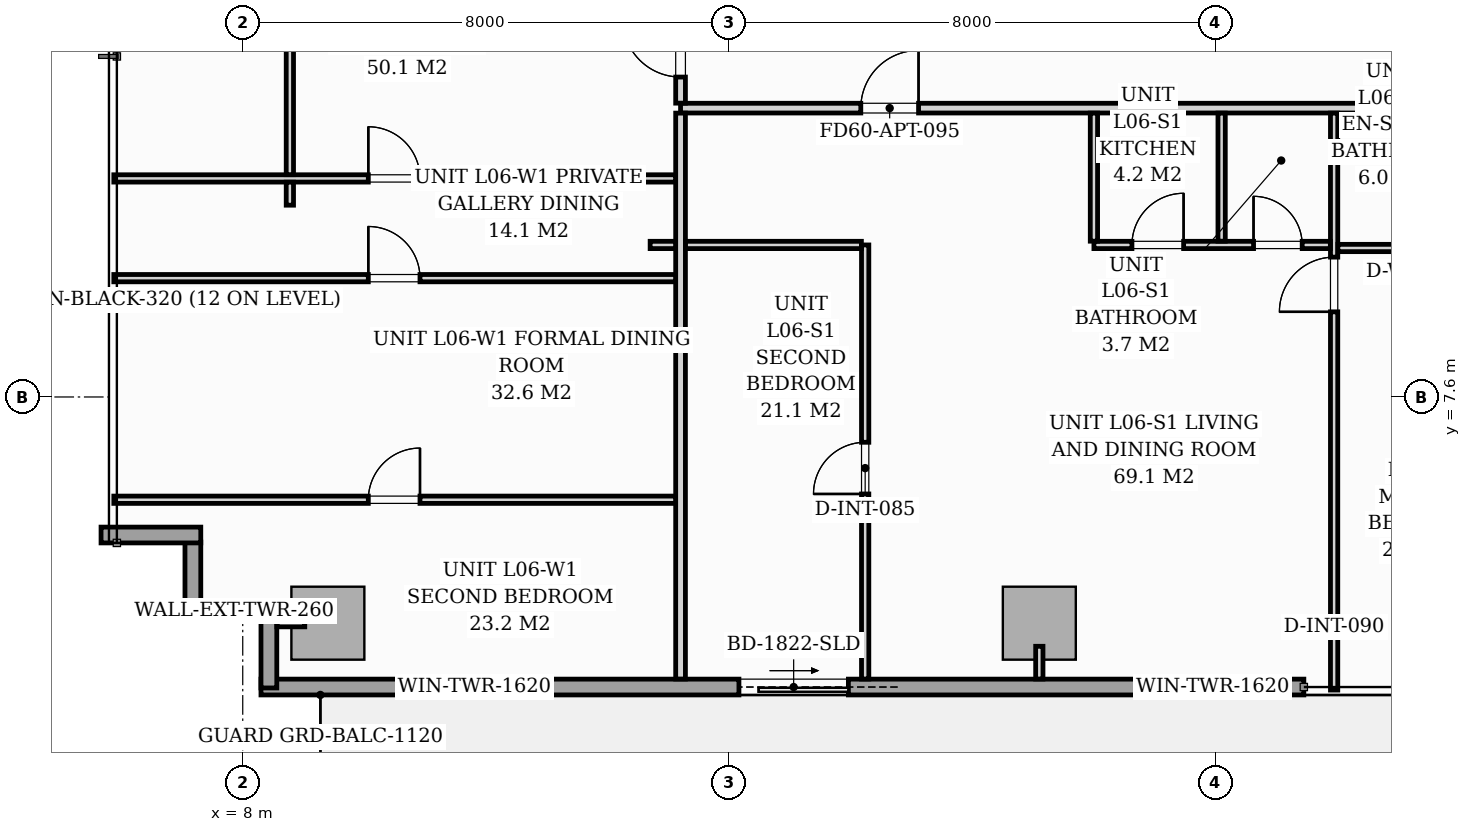
"""IFC4 building model, lengths in metres.
Left out: names, types, materials, properties, quantities, classifications, styles, units other than length and angle.
Written with IfcOpenShell. Run it as: python <this file> out.ifc"""

import sys

from ifc_helpers import new_model, si_unit, direction, frame, frame_2d, origin, origin_2d, place, context, subcontext, project, spatial, rectangle, extrude, source, transform, mapped, element, fill, save


model = new_model("IFC4")
c1 = context("Model", 3, precision=1e-05, world=origin(), true_north=direction((0.0, 1.0)))
c2 = subcontext(c1, "Body", "Model", "MODEL_VIEW")
j1 = project(units=[si_unit("LENGTHUNIT", "METRE"), si_unit("PLANEANGLEUNIT", "RADIAN")], contexts=[c1])
p1 = place(None, origin())
s1 = spatial("IfcSite", under=j1, at=p1, CompositionType="ELEMENT")
p2 = place(p1, origin())
s2 = spatial("IfcBuilding", under=s1, at=p2, CompositionType="ELEMENT")
p3 = place(p2, frame((0.0, 0.0, 26.2)))
s3 = spatial("IfcBuildingStorey", under=s2, at=p3, CompositionType="ELEMENT", Elevation=26.2)
m1 = source(origin(), c2, "Body", "SweptSolid", [
    extrude(rectangle(XDim=1.2, YDim=1.2, at=origin_2d()), origin(), (0.0, 0.0, 1.0), 3.196),
])
for number, where, z_axis, x_axis in (
    (1, (9.4, 3.88, 0.002), (0.0, 0.0, 1.0), (1.0, 0.0, 0.0)),
    (2, (21.1, 3.88, 0.002), (0.0, 0.0, 1.0), (1.0, 0.0, 0.0)),
):
    element("IfcColumn", number, at=place(p3, frame(where, z_axis=z_axis, x_axis=x_axis)), inside=s3, PredefinedType="COLUMN", context=c2, shape_type="MappedRepresentation", body=[
        mapped(m1, transform((0.0, 0.0, 0.0), scale=1.0)),
    ])
p4 = place(p3, frame((8.798, 4.08, 0.0), z_axis=(0.0, 0.0, 1.0), x_axis=(-1.0, 0.0, 0.0)))
e3 = element("IfcWall", 3, at=p4, inside=s3, PredefinedType="STANDARD", context=c2, shape_type="SweptSolid", body=[
    extrude(rectangle(XDim=1.878, YDim=0.26, at=frame_2d((0.939, 0.0))), origin(), (0.0, 0.0, 1.0), 2.94),
])
p5 = place(p3, frame((7.18, 4.065, 0.0), z_axis=(0.0, 0.0, 1.0), x_axis=(0.0, 1.0, 0.0)))
e4 = element("IfcWall", 4, at=p5, inside=s3, PredefinedType="STANDARD", context=c2, shape_type="SweptSolid", body=[
    extrude(rectangle(XDim=1.15, YDim=0.26, at=frame_2d((0.575, 0.0))), origin(), (0.0, 0.0, 1.0), 2.94),
])
p6 = place(p3, frame((7.31, 5.33, 0.0), z_axis=(0.0, 0.0, 1.0), x_axis=(-1.0, 0.0, 0.0)))
e5 = element("IfcWall", 5, at=p6, inside=s3, PredefinedType="STANDARD", context=c2, shape_type="SweptSolid", body=[
    extrude(rectangle(XDim=1.64, YDim=0.26, at=frame_2d((0.82, 0.0))), origin(), (0.0, 0.0, 1.0), 2.94),
])
p7 = place(p3, frame((25.45, 2.83, 0.0), z_axis=(0.0, 0.0, 1.0), x_axis=(-1.0, 0.0, 0.0)))
e6 = element("IfcWall", 6, at=p7, inside=s3, PredefinedType="STANDARD", context=c2, shape_type="SweptSolid", body=[
    extrude(rectangle(XDim=17.15, YDim=0.26, at=frame_2d((8.575, 0.0))), origin(), (0.0, 0.0, 1.0), 2.94),
])
p8 = place(p7, frame((7.49, 0.0, 0.0)))
e7 = element("IfcOpeningElement", 7, at=p8, cuts=e6, PredefinedType="OPENING", context=c2, shape_type="SweptSolid", body=[
    extrude(rectangle(XDim=1.8, YDim=2.06, at=frame_2d((0.9, 1.03))), frame((0.0, 0.14, 0.0), z_axis=(0.0, -1.0, 0.0), x_axis=(1.0, 0.0, 0.0)), (0.0, 0.0, 1.0), 0.28),
])
p9 = place(p7, frame((0.7, 0.0, 0.65)))
e8 = element("IfcOpeningElement", 8, at=p9, cuts=e6, PredefinedType="OPENING", context=c2, shape_type="SweptSolid", body=[
    extrude(rectangle(XDim=1.6, YDim=1.5, at=frame_2d((0.8, 0.75))), frame((0.0, 0.14, 0.0), z_axis=(0.0, -1.0, 0.0), x_axis=(1.0, 0.0, 0.0)), (0.0, 0.0, 1.0), 0.28),
])
p10 = place(p7, frame((12.84, 0.0, 0.75)))
e9 = element("IfcOpeningElement", 9, at=p10, cuts=e6, PredefinedType="OPENING", context=c2, shape_type="SweptSolid", body=[
    extrude(rectangle(XDim=1.6, YDim=1.5, at=frame_2d((0.8, 0.75))), frame((0.0, 0.14, 0.0), z_axis=(0.0, -1.0, 0.0), x_axis=(1.0, 0.0, 0.0)), (0.0, 0.0, 1.0), 0.28),
])
p11 = place(p3, frame((8.43, 2.815, 0.0), z_axis=(0.0, 0.0, 1.0), x_axis=(0.0, 1.0, 0.0)))
e10 = element("IfcWall", 10, at=p11, inside=s3, PredefinedType="STANDARD", context=c2, shape_type="SweptSolid", body=[
    extrude(rectangle(XDim=1.395, YDim=0.26, at=frame_2d((0.698, 0.0))), origin(), (0.0, 0.0, 1.0), 2.94),
])
p12 = place(p3, frame((15.2, 12.35, 0.0), z_axis=(0.0, 0.0, 1.0), x_axis=(1.0, 0.0, 0.0)))
e11 = element("IfcWall", 11, at=p12, inside=s3, PredefinedType="PARTITIONING", context=c2, shape_type="SweptSolid", body=[
    extrude(rectangle(XDim=37.1, YDim=0.16, at=frame_2d((18.55, 0.0))), origin(), (0.0, 0.0, 1.0), 2.94),
])
p13 = place(p12, frame((2.964, 0.0, 0.0)))
e12 = element("IfcOpeningElement", 12, at=p13, cuts=e11, PredefinedType="OPENING", context=c2, shape_type="SweptSolid", body=[
    extrude(rectangle(XDim=0.95, YDim=2.06, at=frame_2d((0.475, 1.03))), frame((0.0, 0.09, 0.0), z_axis=(0.0, -1.0, 0.0), x_axis=(1.0, 0.0, 0.0)), (0.0, 0.0, 1.0), 0.18),
])
p14 = place(p12, frame((28.202, 0.0, 0.0)))
e13 = element("IfcOpeningElement", 13, at=p14, cuts=e11, PredefinedType="OPENING", context=c2, shape_type="SweptSolid", body=[
    extrude(rectangle(XDim=0.95, YDim=2.06, at=frame_2d((0.475, 1.03))), frame((0.0, 0.09, 0.0), z_axis=(0.0, -1.0, 0.0), x_axis=(1.0, 0.0, 0.0)), (0.0, 0.0, 1.0), 0.18),
])
p15 = place(p3, frame((15.2, 2.962, 0.0), z_axis=(0.0, 0.0, 1.0), x_axis=(0.0, 1.0, 0.0)))
e14 = element("IfcWall", 14, at=p15, inside=s3, PredefinedType="PARTITIONING", context=c2, shape_type="SweptSolid", body=[
    extrude(rectangle(XDim=9.306, YDim=0.16, at=frame_2d((4.653, 0.0))), origin(), (0.0, 0.0, 1.0), 2.94),
])
p16 = place(p3, frame((15.2, 12.432, 0.0), z_axis=(0.0, 0.0, 1.0), x_axis=(0.0, 1.0, 0.0)))
e15 = element("IfcWall", 15, at=p16, inside=s3, PredefinedType="PARTITIONING", context=c2, shape_type="SweptSolid", body=[
    extrude(rectangle(XDim=15.006, YDim=0.16, at=frame_2d((7.503, 0.0))), origin(), (0.0, 0.0, 1.0), 2.94),
])
p17 = place(p16, frame((0.429, 0.0, 0.0)))
e16 = element("IfcOpeningElement", 16, at=p17, cuts=e15, PredefinedType="OPENING", context=c2, shape_type="SweptSolid", body=[
    extrude(rectangle(XDim=0.95, YDim=2.06, at=frame_2d((0.475, 1.03))), frame((0.0, 0.09, 0.0), z_axis=(0.0, -1.0, 0.0), x_axis=(1.0, 0.0, 0.0)), (0.0, 0.0, 1.0), 0.18),
])
p18 = place(p3, frame((25.948, 2.78, 0.0), z_axis=(0.0, 0.0, 1.0), x_axis=(0.0, 1.0, 0.0)))
e17 = element("IfcWall", 17, at=p18, inside=s3, PredefinedType="PARTITIONING", context=c2, shape_type="SweptSolid", body=[
    extrude(rectangle(XDim=9.488, YDim=0.12, at=frame_2d((4.744, 0.0))), origin(), (0.0, 0.0, 1.0), 2.94),
])
p19 = place(p18, frame((6.22, 0.0, 0.0)))
e18 = element("IfcOpeningElement", 18, at=p19, cuts=e17, PredefinedType="OPENING", context=c2, shape_type="SweptSolid", body=[
    extrude(rectangle(XDim=0.9, YDim=2.05, at=frame_2d((0.45, 1.025))), frame((0.0, 0.07, 0.0), z_axis=(0.0, -1.0, 0.0), x_axis=(1.0, 0.0, 0.0)), (0.0, 0.0, 1.0), 0.14),
])
p20 = place(p3, frame((21.998, 10.1, 0.0), z_axis=(0.0, 0.0, 1.0), x_axis=(1.0, 0.0, 0.0)))
e19 = element("IfcWall", 19, at=p20, inside=s3, PredefinedType="PARTITIONING", context=c2, shape_type="SweptSolid", body=[
    extrude(rectangle(XDim=3.888, YDim=0.12, at=frame_2d((1.944, 0.0))), origin(), (0.0, 0.0, 1.0), 2.94),
])
p21 = place(p20, frame((0.625, 0.0, 0.0)))
e20 = element("IfcOpeningElement", 20, at=p21, cuts=e19, PredefinedType="OPENING", context=c2, shape_type="SweptSolid", body=[
    extrude(rectangle(XDim=0.85, YDim=2.05, at=frame_2d((0.425, 1.025))), frame((0.0, 0.07, 0.0), z_axis=(0.0, -1.0, 0.0), x_axis=(1.0, 0.0, 0.0)), (0.0, 0.0, 1.0), 0.14),
])
p22 = place(p20, frame((2.625, 0.0, 0.0)))
e21 = element("IfcOpeningElement", 21, at=p22, cuts=e19, PredefinedType="OPENING", context=c2, shape_type="SweptSolid", body=[
    extrude(rectangle(XDim=0.8, YDim=2.02, at=frame_2d((0.4, 1.01))), frame((0.0, 0.07, 0.0), z_axis=(0.0, -1.0, 0.0), x_axis=(1.0, 0.0, 0.0)), (0.0, 0.0, 1.0), 0.14),
])
for number, where, z_axis, x_axis in (
    (22, (24.098, 10.162, 0.0), (0.0, 0.0, 1.0), (0.0, 1.0, 0.0)),
    (23, (21.998, 10.162, 0.0), (0.0, 0.0, 1.0), (0.0, 1.0, 0.0)),
):
    element("IfcWall", number, at=place(p3, frame(where, z_axis=z_axis, x_axis=x_axis)), inside=s3, PredefinedType="PARTITIONING", context=c2, shape_type="SweptSolid", body=[
        extrude(rectangle(XDim=2.106, YDim=0.12, at=frame_2d((1.053, 0.0))), origin(), (0.0, 0.0, 1.0), 2.94),
    ])
p23 = place(p3, frame((26.01, 10.05, 0.0), z_axis=(0.0, 0.0, 1.0), x_axis=(1.0, 0.0, 0.0)))
e24 = element("IfcWall", 24, at=p23, inside=s3, PredefinedType="PARTITIONING", context=c2, shape_type="SweptSolid", body=[
    extrude(rectangle(XDim=2.888, YDim=0.12, at=frame_2d((1.444, 0.0))), origin(), (0.0, 0.0, 1.0), 2.94),
])
p24 = place(p23, frame((0.963, 0.0, 0.0)))
e25 = element("IfcOpeningElement", 25, at=p24, cuts=e24, PredefinedType="OPENING", context=c2, shape_type="SweptSolid", body=[
    extrude(rectangle(XDim=0.8, YDim=2.02, at=frame_2d((0.4, 1.01))), frame((0.0, 0.07, 0.0), z_axis=(0.0, -1.0, 0.0), x_axis=(1.0, 0.0, 0.0)), (0.0, 0.0, 1.0), 0.14),
])
p25 = place(p3, frame((18.236, 2.962, 0.0), z_axis=(0.0, 0.0, 1.0), x_axis=(0.0, 1.0, 0.0)))
e26 = element("IfcWall", 26, at=p25, inside=s3, PredefinedType="PARTITIONING", context=c2, shape_type="SweptSolid", body=[
    extrude(rectangle(XDim=7.138, YDim=0.12, at=frame_2d((3.569, 0.0))), origin(), (0.0, 0.0, 1.0), 2.94),
])
p26 = place(p25, frame((3.043, 0.0, 0.0)))
e27 = element("IfcOpeningElement", 27, at=p26, cuts=e26, PredefinedType="OPENING", context=c2, shape_type="SweptSolid", body=[
    extrude(rectangle(XDim=0.85, YDim=2.05, at=frame_2d((0.425, 1.025))), frame((0.0, 0.07, 0.0), z_axis=(0.0, -1.0, 0.0), x_axis=(1.0, 0.0, 0.0)), (0.0, 0.0, 1.0), 0.14),
])
p27 = place(p3, frame((14.7, 10.1, 0.0), z_axis=(0.0, 0.0, 1.0), x_axis=(1.0, 0.0, 0.0)))
e28 = element("IfcWall", 28, at=p27, inside=s3, PredefinedType="PARTITIONING", context=c2, shape_type="SweptSolid", body=[
    extrude(rectangle(XDim=0.418, YDim=0.12, at=frame_2d((0.209, 0.0))), origin(), (0.0, 0.0, 1.0), 2.94),
])
p28 = place(p3, frame((15.282, 10.1, 0.0), z_axis=(0.0, 0.0, 1.0), x_axis=(1.0, 0.0, 0.0)))
e29 = element("IfcWall", 29, at=p28, inside=s3, PredefinedType="PARTITIONING", context=c2, shape_type="SweptSolid", body=[
    extrude(rectangle(XDim=2.892, YDim=0.12, at=frame_2d((1.446, 0.0))), origin(), (0.0, 0.0, 1.0), 2.94),
])
p29 = place(p3, frame((5.88, 5.91, 0.0), z_axis=(0.0, 0.0, 1.0), x_axis=(1.0, 0.0, 0.0)))
e30 = element("IfcWall", 30, at=p29, inside=s3, PredefinedType="PARTITIONING", context=c2, shape_type="SweptSolid", body=[
    extrude(rectangle(XDim=9.238, YDim=0.12, at=frame_2d((4.619, 0.0))), origin(), (0.0, 0.0, 1.0), 2.94),
])
p30 = place(p29, frame((4.185, 0.0, 0.0)))
e31 = element("IfcOpeningElement", 31, at=p30, cuts=e30, PredefinedType="OPENING", context=c2, shape_type="SweptSolid", body=[
    extrude(rectangle(XDim=0.85, YDim=2.05, at=frame_2d((0.425, 1.025))), frame((0.0, 0.07, 0.0), z_axis=(0.0, -1.0, 0.0), x_axis=(1.0, 0.0, 0.0)), (0.0, 0.0, 1.0), 0.14),
])
p31 = place(p3, frame((5.88, 9.554, 0.0), z_axis=(0.0, 0.0, 1.0), x_axis=(1.0, 0.0, 0.0)))
e32 = element("IfcWall", 32, at=p31, inside=s3, PredefinedType="PARTITIONING", context=c2, shape_type="SweptSolid", body=[
    extrude(rectangle(XDim=9.238, YDim=0.12, at=frame_2d((4.619, 0.0))), origin(), (0.0, 0.0, 1.0), 2.94),
])
p32 = place(p31, frame((4.185, 0.0, 0.0)))
e33 = element("IfcOpeningElement", 33, at=p32, cuts=e32, PredefinedType="OPENING", context=c2, shape_type="SweptSolid", body=[
    extrude(rectangle(XDim=0.85, YDim=2.05, at=frame_2d((0.425, 1.025))), frame((0.0, 0.07, 0.0), z_axis=(0.0, -1.0, 0.0), x_axis=(1.0, 0.0, 0.0)), (0.0, 0.0, 1.0), 0.14),
])
p33 = place(p3, frame((5.88, 11.194, 0.0), z_axis=(0.0, 0.0, 1.0), x_axis=(1.0, 0.0, 0.0)))
e34 = element("IfcWall", 34, at=p33, inside=s3, PredefinedType="PARTITIONING", context=c2, shape_type="SweptSolid", body=[
    extrude(rectangle(XDim=9.238, YDim=0.12, at=frame_2d((4.619, 0.0))), origin(), (0.0, 0.0, 1.0), 2.94),
])
p34 = place(p33, frame((4.185, 0.0, 0.0)))
e35 = element("IfcOpeningElement", 35, at=p34, cuts=e34, PredefinedType="OPENING", context=c2, shape_type="SweptSolid", body=[
    extrude(rectangle(XDim=0.85, YDim=2.05, at=frame_2d((0.425, 1.025))), frame((0.0, 0.07, 0.0), z_axis=(0.0, -1.0, 0.0), x_axis=(1.0, 0.0, 0.0)), (0.0, 0.0, 1.0), 0.14),
])
p35 = place(p3, frame((8.775, 10.754, 0.0), z_axis=(0.0, 0.0, 1.0), x_axis=(0.0, 1.0, 0.0)))
e36 = element("IfcWall", 36, at=p35, inside=s3, PredefinedType="PARTITIONING", context=c2, shape_type="SweptSolid", body=[
    extrude(rectangle(XDim=0.378, YDim=0.12, at=frame_2d((0.189, 0.0))), origin(), (0.0, 0.0, 1.0), 2.94),
])
p36 = place(p3, frame((8.775, 11.256, 0.0), z_axis=(0.0, 0.0, 1.0), x_axis=(0.0, 1.0, 0.0)))
e37 = element("IfcWall", 37, at=p36, inside=s3, PredefinedType="PARTITIONING", context=c2, shape_type="SweptSolid", body=[
    extrude(rectangle(XDim=9.663, YDim=0.12, at=frame_2d((4.832, 0.0))), origin(), (0.0, 0.0, 1.0), 2.94),
])
p37 = place(p36, frame((4.766, 0.0, 0.0)))
e38 = element("IfcOpeningElement", 38, at=p37, cuts=e37, PredefinedType="OPENING", context=c2, shape_type="SweptSolid", body=[
    extrude(rectangle(XDim=0.85, YDim=2.05, at=frame_2d((0.425, 1.025))), frame((0.0, 0.07, 0.0), z_axis=(0.0, -1.0, 0.0), x_axis=(1.0, 0.0, 0.0)), (0.0, 0.0, 1.0), 0.14),
])
p38 = place(p3, frame((9.02, 3.88, 0.0), z_axis=(0.0, 0.0, 1.0), x_axis=(-1.0, 0.0, 0.0)))
e39 = element("IfcWall", 39, at=p38, inside=s3, PredefinedType="PARTITIONING", context=c2, shape_type="SweptSolid", body=[
    extrude(rectangle(XDim=0.458, YDim=0.12, at=frame_2d((0.229, 0.0))), origin(), (0.0, 0.0, 1.0), 2.94),
])
p39 = place(p3, frame((21.1, 3.5, 0.0), z_axis=(0.0, 0.0, 1.0), x_axis=(0.0, -1.0, 0.0)))
e40 = element("IfcWall", 40, at=p39, inside=s3, PredefinedType="PARTITIONING", context=c2, shape_type="SweptSolid", body=[
    extrude(rectangle(XDim=0.538, YDim=0.12, at=frame_2d((0.269, 0.0))), origin(), (0.0, 0.0, 1.0), 2.94),
])
m2 = source(origin(), c2, "Body", "SweptSolid", [
    extrude(rectangle(XDim=1.8, YDim=2.06, at=frame_2d((0.9, 1.03))), frame((0.0, 0.025, 0.0), z_axis=(0.0, -1.0, 0.0), x_axis=(1.0, 0.0, 0.0)), (0.0, 0.0, 1.0), 0.05),
])
p40 = place(p8, origin())
e41 = element("IfcDoor", 41, at=p40, inside=s3, OperationType="SLIDING_TO_LEFT", PredefinedType="DOOR", context=c2, shape_type="MappedRepresentation", body=[
    mapped(m2, transform((0.0, 0.0, 0.0), scale=1.0)),
])
fill(e7, e41)
m3 = source(origin(), c2, "Body", "SweptSolid", [
    extrude(rectangle(XDim=1.6, YDim=1.5, at=frame_2d((0.8, 0.75))), frame((0.0, 0.03, 0.0), z_axis=(0.0, -1.0, 0.0), x_axis=(1.0, 0.0, 0.0)), (0.0, 0.0, 1.0), 0.06),
])
p41 = place(p9, origin())
e42 = element("IfcWindow", 42, at=p41, inside=s3, PartitioningType="SINGLE_PANEL", PredefinedType="WINDOW", context=c2, shape_type="MappedRepresentation", body=[
    mapped(m3, transform((0.0, 0.0, 0.0), scale=1.0)),
])
fill(e8, e42)
p42 = place(p10, origin())
e43 = element("IfcWindow", 43, at=p42, inside=s3, PartitioningType="SINGLE_PANEL", PredefinedType="WINDOW", context=c2, shape_type="MappedRepresentation", body=[
    mapped(m3, transform((0.0, 0.0, 0.0), scale=1.0)),
])
fill(e9, e43)
m4 = source(origin(), c2, "Body", "SweptSolid", [
    extrude(rectangle(XDim=0.85, YDim=2.05, at=frame_2d((0.425, 1.025))), frame((0.0, 0.025, 0.0), z_axis=(0.0, -1.0, 0.0), x_axis=(1.0, 0.0, 0.0)), (0.0, 0.0, 1.0), 0.05),
])
p43 = place(p26, origin())
e44 = element("IfcDoor", 44, at=p43, inside=s3, OperationType="SINGLE_SWING_LEFT", PredefinedType="DOOR", context=c2, shape_type="MappedRepresentation", body=[
    mapped(m4, transform((0.0, 0.0, 0.0), scale=1.0)),
])
fill(e27, e44)
m5 = source(origin(), c2, "Body", "SweptSolid", [
    extrude(rectangle(XDim=0.95, YDim=2.06, at=frame_2d((0.475, 1.03))), frame((0.0, 0.025, 0.0), z_axis=(0.0, -1.0, 0.0), x_axis=(1.0, 0.0, 0.0)), (0.0, 0.0, 1.0), 0.05),
])
p44 = place(p13, origin())
e45 = element("IfcDoor", 45, at=p44, inside=s3, OperationType="SINGLE_SWING_RIGHT", PredefinedType="DOOR", context=c2, shape_type="MappedRepresentation", body=[
    mapped(m5, transform((0.0, 0.0, 0.0), scale=1.0)),
])
fill(e12, e45)
m6 = source(origin(), c2, "Body", "SweptSolid", [
    extrude(rectangle(XDim=0.9, YDim=2.05, at=frame_2d((0.45, 1.025))), frame((0.0, 0.025, 0.0), z_axis=(0.0, -1.0, 0.0), x_axis=(1.0, 0.0, 0.0)), (0.0, 0.0, 1.0), 0.05),
])
p45 = place(p19, origin())
e46 = element("IfcDoor", 46, at=p45, inside=s3, OperationType="SINGLE_SWING_LEFT", PredefinedType="DOOR", context=c2, shape_type="MappedRepresentation", body=[
    mapped(m6, transform((0.0, 0.0, 0.0), scale=1.0)),
])
fill(e18, e46)
p46 = place(p21, origin())
e47 = element("IfcDoor", 47, at=p46, inside=s3, OperationType="SINGLE_SWING_RIGHT", PredefinedType="DOOR", context=c2, shape_type="MappedRepresentation", body=[
    mapped(m4, transform((0.0, 0.0, 0.0), scale=1.0)),
])
fill(e20, e47)
m7 = source(origin(), c2, "Body", "SweptSolid", [
    extrude(rectangle(XDim=0.8, YDim=2.02, at=frame_2d((0.4, 1.01))), frame((0.0, 0.025, 0.0), z_axis=(0.0, -1.0, 0.0), x_axis=(1.0, 0.0, 0.0)), (0.0, 0.0, 1.0), 0.05),
])
p47 = place(p22, origin())
e48 = element("IfcDoor", 48, at=p47, inside=s3, OperationType="SINGLE_SWING_LEFT", PredefinedType="DOOR", context=c2, shape_type="MappedRepresentation", body=[
    mapped(m7, transform((0.0, 0.0, 0.0), scale=1.0)),
])
fill(e21, e48)
p48 = place(p17, origin())
e49 = element("IfcDoor", 49, at=p48, inside=s3, OperationType="SINGLE_SWING_RIGHT", PredefinedType="DOOR", context=c2, shape_type="MappedRepresentation", body=[
    mapped(m5, transform((0.0, 0.0, 0.0), scale=1.0)),
])
fill(e16, e49)
p49 = place(p30, origin())
e50 = element("IfcDoor", 50, at=p49, inside=s3, OperationType="SINGLE_SWING_RIGHT", PredefinedType="DOOR", context=c2, shape_type="MappedRepresentation", body=[
    mapped(m4, transform((0.0, 0.0, 0.0), scale=1.0)),
])
fill(e31, e50)
p50 = place(p32, origin())
e51 = element("IfcDoor", 51, at=p50, inside=s3, OperationType="SINGLE_SWING_LEFT", PredefinedType="DOOR", context=c2, shape_type="MappedRepresentation", body=[
    mapped(m4, transform((0.0, 0.0, 0.0), scale=1.0)),
])
fill(e33, e51)
p51 = place(p34, origin())
e52 = element("IfcDoor", 52, at=p51, inside=s3, OperationType="SINGLE_SWING_LEFT", PredefinedType="DOOR", context=c2, shape_type="MappedRepresentation", body=[
    mapped(m4, transform((0.0, 0.0, 0.0), scale=1.0)),
])
fill(e35, e52)
save(model, sys.argv[1])
